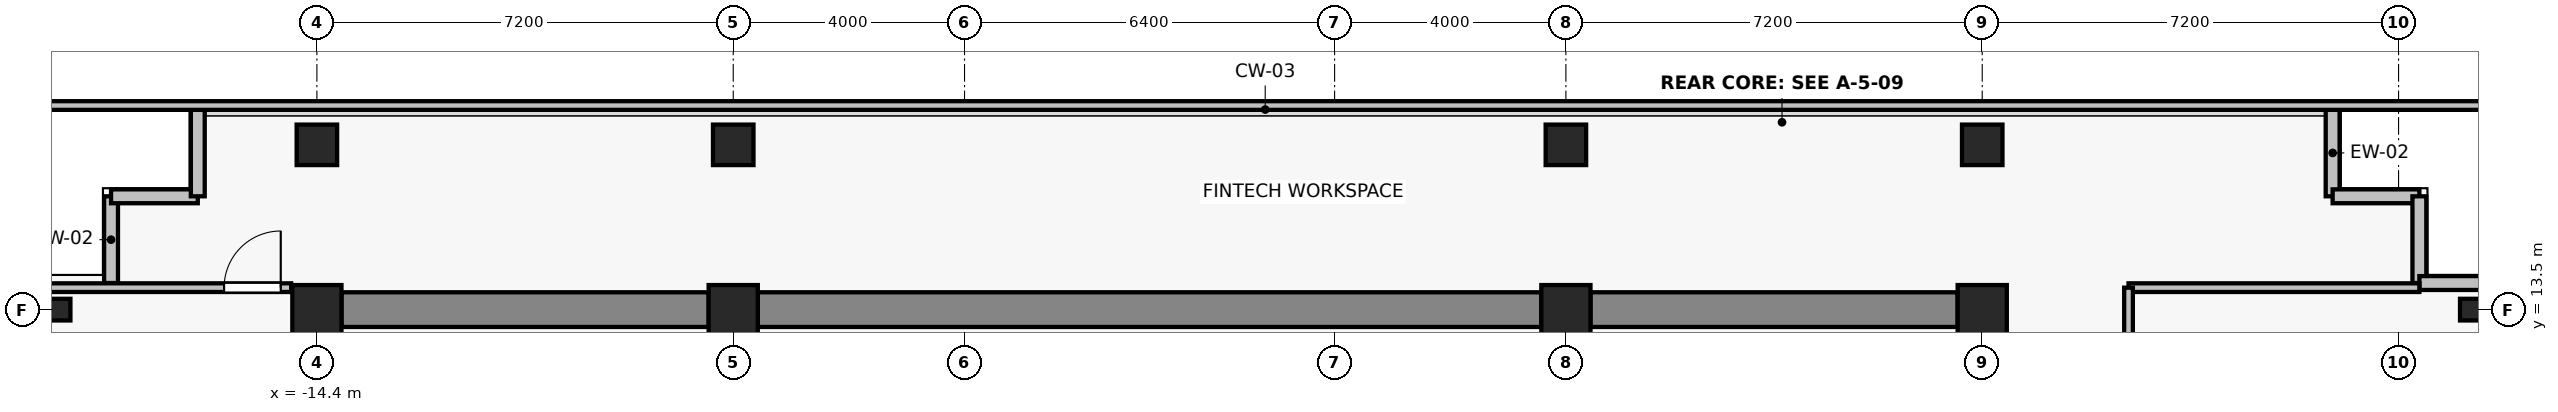
"""IFC4 building model, lengths in metres.
Left out: names, types, materials, properties, quantities, classifications, styles, units other than length and angle.
Written with IfcOpenShell. Run it as: python <this file> out.ifc"""

import sys

from ifc_helpers import new_model, si_unit, direction, frame, frame_2d, origin, origin_2d, place, context, subcontext, project, spatial, rectangle, i_section, extrude, source, transform, mapped, element, fill, save


model = new_model("IFC4")
c1 = context("Model", 3, precision=1e-05, world=origin(), true_north=direction((0.0, 1.0)))
c2 = subcontext(c1, "Body", "Model", "MODEL_VIEW")
j1 = project(units=[si_unit("LENGTHUNIT", "METRE"), si_unit("PLANEANGLEUNIT", "RADIAN")], contexts=[c1])
p1 = place(None, origin())
s1 = spatial("IfcSite", under=j1, at=p1, CompositionType="ELEMENT")
p2 = place(p1, origin())
s2 = spatial("IfcBuilding", under=s1, at=p2, CompositionType="ELEMENT")
p3 = place(p2, frame((0.0, 0.0, 238.6)))
s3 = spatial("IfcBuildingStorey", under=s2, at=p3, CompositionType="ELEMENT", Elevation=238.6)
for number, where, z_axis, x_axis in (
    (1, (-14.4, 13.5, 0.0), (0.0, 0.0, 1.0), (1.0, 0.0, 0.0)),
    (2, (-7.2, 13.5, 0.0), (0.0, 0.0, 1.0), (1.0, 0.0, 0.0)),
    (3, (7.2, 13.5, 0.0), (0.0, 0.0, 1.0), (1.0, 0.0, 0.0)),
    (4, (14.4, 13.5, 0.0), (0.0, 0.0, 1.0), (1.0, 0.0, 0.0)),
):
    element("IfcColumn", number, at=place(p3, frame(where, z_axis=z_axis, x_axis=x_axis)), inside=s3, PredefinedType="COLUMN", context=c2, shape_type="SweptSolid", body=[
        extrude(rectangle(XDim=0.85, YDim=0.85, at=origin_2d()), origin(), (0.0, 0.0, 1.0), 3.3),
    ])
for number, where, z_axis, x_axis in (
    (5, (-14.4, 16.35, 0.0), (0.0, 0.0, 1.0), (1.0, 0.0, 0.0)),
    (6, (-7.2, 16.35, 0.0), (0.0, 0.0, 1.0), (1.0, 0.0, 0.0)),
    (7, (7.2, 16.35, 0.0), (0.0, 0.0, 1.0), (1.0, 0.0, 0.0)),
    (8, (14.4, 16.35, 0.0), (0.0, 0.0, 1.0), (1.0, 0.0, 0.0)),
):
    element("IfcColumn", number, at=place(p3, frame(where, z_axis=z_axis, x_axis=x_axis)), inside=s3, PredefinedType="COLUMN", context=c2, shape_type="SweptSolid", body=[
        extrude(rectangle(XDim=0.7, YDim=0.7, at=origin_2d()), origin(), (0.0, 0.0, 1.0), 3.3),
    ])
for number, where, z_axis, x_axis in (
    (9, (-18.85, 13.5, 0.0), (0.0, 0.0, 1.0), (1.0, 0.0, 0.0)),
    (10, (22.85, 13.5, 0.0), (0.0, 0.0, 1.0), (1.0, 0.0, 0.0)),
):
    element("IfcColumn", number, at=place(p3, frame(where, z_axis=z_axis, x_axis=x_axis)), inside=s3, PredefinedType="COLUMN", context=c2, shape_type="SweptSolid", body=[
        extrude(i_section(OverallWidth=0.375, OverallDepth=0.375, WebThickness=0.017, FlangeThickness=0.027, FilletRadius=0.015, at=origin_2d()), origin(), (0.0, 0.0, 1.0), 3.3),
    ])
p4 = place(p3, frame((-13.975, 13.5, 0.0), z_axis=(0.0, 0.0, 1.0), x_axis=(1.0, 0.0, 0.0)))
e11 = element("IfcWall", 11, at=p4, inside=s3, PredefinedType="SHEAR", context=c2, shape_type="SweptSolid", body=[
    extrude(rectangle(XDim=6.35, YDim=0.6, at=frame_2d((3.175, 0.0))), origin(), (0.0, 0.0, 1.0), 3.075),
])
p5 = place(p3, frame((-6.775, 13.5, 0.0), z_axis=(0.0, 0.0, 1.0), x_axis=(1.0, 0.0, 0.0)))
e12 = element("IfcWall", 12, at=p5, inside=s3, PredefinedType="SHEAR", context=c2, shape_type="SweptSolid", body=[
    extrude(rectangle(XDim=13.55, YDim=0.6, at=frame_2d((6.775, 0.0))), origin(), (0.0, 0.0, 1.0), 3.075),
])
p6 = place(p3, frame((7.625, 13.5, 0.0), z_axis=(0.0, 0.0, 1.0), x_axis=(1.0, 0.0, 0.0)))
e13 = element("IfcWall", 13, at=p6, inside=s3, PredefinedType="SHEAR", context=c2, shape_type="SweptSolid", body=[
    extrude(rectangle(XDim=6.35, YDim=0.6, at=frame_2d((3.175, 0.0))), origin(), (0.0, 0.0, 1.0), 3.075),
])
for number, where, z_axis, x_axis in (
    (14, (-17.96, 15.46, 0.0), (0.0, 0.0, 1.0), (0.0, -1.0, 0.0)),
    (15, (-16.46, 15.46, 0.0), (0.0, 0.0, 1.0), (-1.0, 0.0, 0.0)),
    (16, (-16.46, 16.96, 0.0), (0.0, 0.0, 1.0), (0.0, -1.0, 0.0)),
    (17, (20.46, 15.46, 0.0), (0.0, 0.0, 1.0), (0.0, 1.0, 0.0)),
    (18, (21.96, 15.46, 0.0), (0.0, 0.0, 1.0), (-1.0, 0.0, 0.0)),
    (19, (21.96, 13.96, 0.0), (0.0, 0.0, 1.0), (0.0, 1.0, 0.0)),
    (20, (23.46, 13.96, 0.0), (0.0, 0.0, 1.0), (-1.0, 0.0, 0.0)),
):
    element("IfcWall", number, at=place(p3, frame(where, z_axis=z_axis, x_axis=x_axis)), inside=s3, PredefinedType="SOLIDWALL", context=c2, shape_type="SweptSolid", body=[
        extrude(rectangle(XDim=1.5, YDim=0.24, at=frame_2d((0.75, 0.0))), origin(), (0.0, 0.0, 1.0), 3.075),
    ])
p7 = place(p3, frame((-19.53, 13.88, 0.0), z_axis=(0.0, 0.0, 1.0), x_axis=(1.0, 0.0, 0.0)))
e21 = element("IfcWall", 21, at=p7, inside=s3, PredefinedType="PARTITIONING", context=c2, shape_type="SweptSolid", body=[
    extrude(rectangle(XDim=4.685, YDim=0.15, at=frame_2d((2.343, 0.0))), origin(), (0.0, 0.0, 1.0), 3.075),
])
p8 = place(p7, frame((3.525, 0.0, 0.0)))
e22 = element("IfcOpeningElement", 22, at=p8, cuts=e21, PredefinedType="OPENING", context=c2, shape_type="SweptSolid", body=[
    extrude(rectangle(XDim=0.98, YDim=2.15, at=frame_2d((0.49, 1.075))), frame((0.0, 0.085, 0.0), z_axis=(0.0, -1.0, 0.0), x_axis=(1.0, 0.0, 0.0)), (0.0, 0.0, 1.0), 0.17),
])
p9 = place(p3, frame((16.93, 13.88, 0.0), z_axis=(0.0, 0.0, 1.0), x_axis=(1.0, 0.0, 0.0)))
e23 = element("IfcWall", 23, at=p9, inside=s3, PredefinedType="PARTITIONING", context=c2, shape_type="SweptSolid", body=[
    extrude(rectangle(XDim=5.03, YDim=0.15, at=frame_2d((2.515, 0.0))), origin(), (0.0, 0.0, 1.0), 3.075),
])
p10 = place(p3, frame((16.93, -1.77, 0.0), z_axis=(0.0, 0.0, 1.0), x_axis=(0.0, 1.0, 0.0)))
e24 = element("IfcWall", 24, at=p10, inside=s3, PredefinedType="PARTITIONING", context=c2, shape_type="SweptSolid", body=[
    extrude(rectangle(XDim=15.65, YDim=0.15, at=frame_2d((7.825, 0.0))), origin(), (0.0, 0.0, 1.0), 2.615),
])
p11 = place(p10, frame((7.335, 0.0, 0.0)))
e25 = element("IfcOpeningElement", 25, at=p11, cuts=e24, PredefinedType="OPENING", context=c2, shape_type="SweptSolid", body=[
    extrude(rectangle(XDim=0.98, YDim=2.15, at=frame_2d((0.49, 1.075))), frame((0.0, 0.085, 0.0), z_axis=(0.0, -1.0, 0.0), x_axis=(1.0, 0.0, 0.0)), (0.0, 0.0, 1.0), 0.17),
])
p12 = place(p3, frame((-19.53, 17.03, 0.0), z_axis=(0.0, 0.0, 1.0), x_axis=(1.0, 0.0, 0.0)))
e26 = element("IfcWall", 26, at=p12, inside=s3, PredefinedType="PARTITIONING", context=c2, shape_type="SweptSolid", body=[
    extrude(rectangle(XDim=43.06, YDim=0.15, at=frame_2d((21.53, 0.0))), origin(), (0.0, 0.0, 1.0), 3.075),
])
m1 = source(origin(), c2, "Body", "SweptSolid", [
    extrude(rectangle(XDim=0.98, YDim=2.15, at=frame_2d((0.49, 1.075))), frame((0.0, 0.025, 0.0), z_axis=(0.0, -1.0, 0.0), x_axis=(1.0, 0.0, 0.0)), (0.0, 0.0, 1.0), 0.05),
])
p13 = place(p8, origin())
e27 = element("IfcDoor", 27, at=p13, inside=s3, OperationType="SINGLE_SWING_RIGHT", PredefinedType="DOOR", context=c2, shape_type="MappedRepresentation", body=[
    mapped(m1, transform((0.0, 0.0, 0.0), x_axis=(1.0, 0.0, 0.0), y_axis=(0.0, 1.0, 0.0), z_axis=(0.0, 0.0, 1.0), scale=1.0)),
])
fill(e22, e27)
save(model, sys.argv[1])
